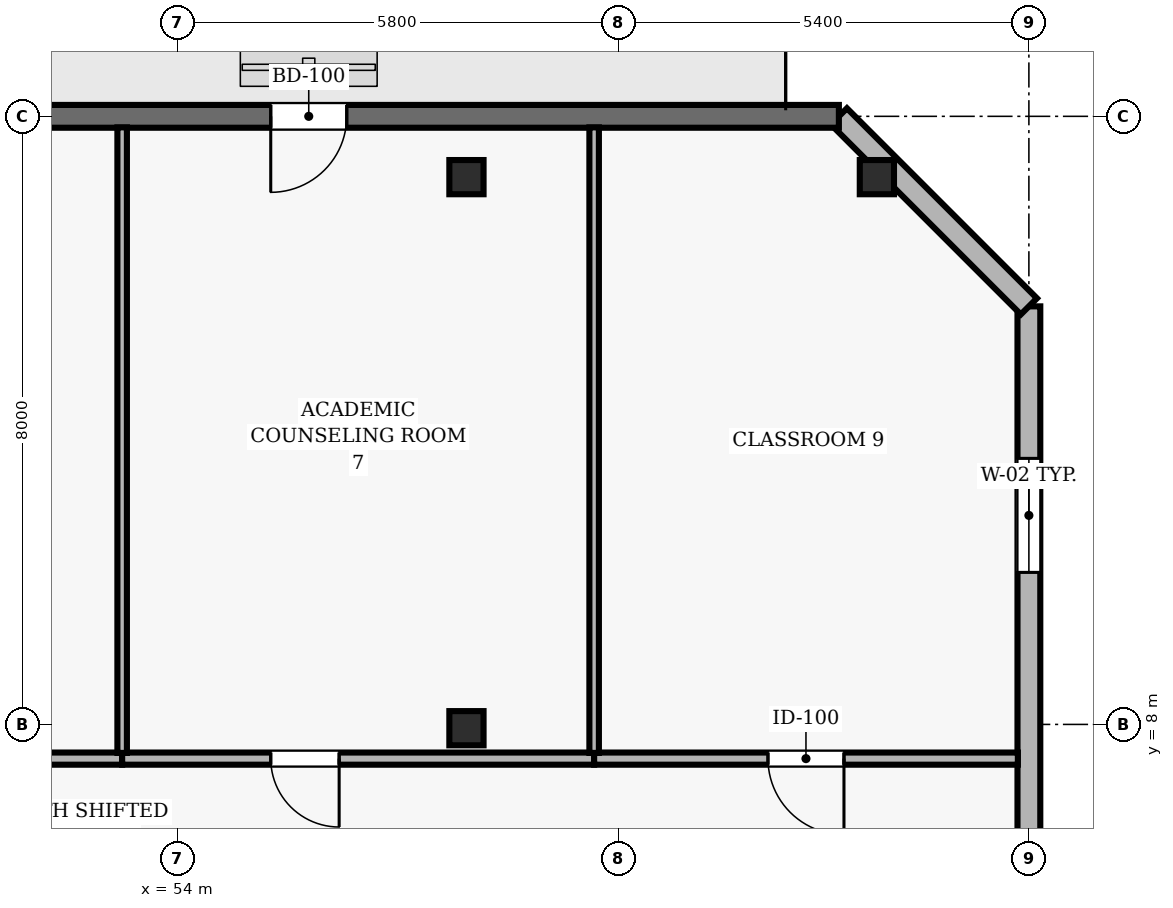
"""IFC4 building model, lengths in metres.
Left out: names, types, materials, properties, quantities, classifications, styles, units other than length and angle.
Written with IfcOpenShell. Run it as: python <this file> out.ifc"""

import sys

from ifc_helpers import new_model, si_unit, direction, frame, frame_2d, origin, origin_2d, place, context, subcontext, project, spatial, rectangle, hollow_rectangle, extrude, element, fill, save


model = new_model("IFC4")
c1 = context("Model", 3, precision=1e-05, world=origin(), true_north=direction((0.0, 1.0)))
c2 = subcontext(c1, "Body", "Model", "MODEL_VIEW")
j1 = project(units=[si_unit("LENGTHUNIT", "METRE"), si_unit("PLANEANGLEUNIT", "RADIAN")], contexts=[c1])
p1 = place(None, origin())
s1 = spatial("IfcSite", under=j1, at=p1, CompositionType="ELEMENT")
p2 = place(p1, origin())
s2 = spatial("IfcBuilding", under=s1, at=p2, CompositionType="ELEMENT")
p3 = place(p2, frame((0.0, 0.0, 195.3)))
s3 = spatial("IfcBuildingStorey", under=s2, at=p3, CompositionType="ELEMENT", Elevation=195.3)
for number, where, z_axis, x_axis in (
    (1, (57.8, 7.95, 0.0), (0.0, 0.0, 1.0), (1.0, 0.0, 0.0)),
    (2, (57.8, 15.2, 0.0), (0.0, 0.0, 1.0), (1.0, 0.0, 0.0)),
    (3, (63.2, 15.2, 0.0), (0.0, 0.0, 1.0), (1.0, 0.0, 0.0)),
):
    element("IfcColumn", number, at=place(p3, frame(where, z_axis=z_axis, x_axis=x_axis)), inside=s3, PredefinedType="COLUMN", context=c2, shape_type="SweptSolid", body=[
        extrude(hollow_rectangle(XDim=0.45, YDim=0.45, WallThickness=0.02, at=origin_2d()), origin(), (0.0, 0.0, 1.0), 3.9),
    ])
p4 = place(p3, frame((65.2, 2.5, 0.0), z_axis=(0.0, 0.0, 1.0), x_axis=(0.0, 1.0, 0.0)))
e4 = element("IfcWall", 4, at=p4, inside=s3, PredefinedType="SOLIDWALL", context=c2, shape_type="SweptSolid", body=[
    extrude(rectangle(XDim=11.0, YDim=0.3, at=frame_2d((5.5, 0.0))), origin(), (0.0, 0.0, 1.0), 3.69),
])
p5 = place(p4, frame((7.5, 0.0, 0.9)))
e5 = element("IfcOpeningElement", 5, at=p5, cuts=e4, PredefinedType="OPENING", context=c2, shape_type="SweptSolid", body=[
    extrude(rectangle(XDim=1.5, YDim=1.6, at=frame_2d((0.75, 0.8))), frame((0.0, 0.16, 0.0), z_axis=(0.0, -1.0, 0.0), x_axis=(1.0, 0.0, 0.0)), (0.0, 0.0, 1.0), 0.32),
])
p6 = place(p3, frame((65.2, 13.5, 0.0), z_axis=(0.0, 0.0, 1.0), x_axis=(-0.707106781187, 0.707106781187, 0.0)))
e6 = element("IfcWall", 6, at=p6, inside=s3, PredefinedType="SOLIDWALL", context=c2, shape_type="SweptSolid", body=[
    extrude(rectangle(XDim=3.536, YDim=0.3, at=frame_2d((1.768, 0.0))), origin(), (0.0, 0.0, 1.0), 3.69),
])
p7 = place(p3, frame((62.7, 16.0, 0.0), z_axis=(0.0, 0.0, 1.0), x_axis=(-1.0, 0.0, 0.0)))
e7 = element("IfcWall", 7, at=p7, inside=s3, PredefinedType="SOLIDWALL", context=c2, shape_type="SweptSolid", body=[
    extrude(rectangle(XDim=15.6, YDim=0.3, at=frame_2d((7.8, 0.0))), origin(), (0.0, 0.0, 1.0), 3.69),
])
p8 = place(p7, frame((6.475, 0.0, 0.0)))
e8 = element("IfcOpeningElement", 8, at=p8, cuts=e7, PredefinedType="OPENING", context=c2, shape_type="SweptSolid", body=[
    extrude(rectangle(XDim=1.0, YDim=2.2, at=frame_2d((0.5, 1.1))), frame((0.0, 0.16, 0.0), z_axis=(0.0, -1.0, 0.0), x_axis=(1.0, 0.0, 0.0)), (0.0, 0.0, 1.0), 0.32),
])
p9 = place(p7, frame((13.675, 0.0, 0.0)))
e9 = element("IfcOpeningElement", 9, at=p9, cuts=e7, PredefinedType="OPENING", context=c2, shape_type="SweptSolid", body=[
    extrude(rectangle(XDim=1.35, YDim=2.2, at=frame_2d((0.675, 1.1))), frame((0.0, 0.16, 0.0), z_axis=(0.0, -1.0, 0.0), x_axis=(1.0, 0.0, 0.0)), (0.0, 0.0, 1.0), 0.32),
])
p10 = place(p7, frame((10.65, 0.0, 0.9)))
e10 = element("IfcOpeningElement", 10, at=p10, cuts=e7, PredefinedType="OPENING", context=c2, shape_type="SweptSolid", body=[
    extrude(rectangle(XDim=2.1, YDim=1.6, at=frame_2d((1.05, 0.8))), frame((0.0, 0.16, 0.0), z_axis=(0.0, -1.0, 0.0), x_axis=(1.0, 0.0, 0.0)), (0.0, 0.0, 1.0), 0.32),
])
p11 = place(p3, frame((53.27, 7.55, 0.0), z_axis=(0.0, 0.0, 1.0), x_axis=(-1.0, 0.0, 0.0)))
e11 = element("IfcWall", 11, at=p11, inside=s3, PredefinedType="PARTITIONING", context=c2, shape_type="SweptSolid", body=[
    extrude(rectangle(XDim=7.27, YDim=0.16, at=frame_2d((3.635, 0.0))), origin(), (0.0, 0.0, 1.0), 3.146),
])
p12 = place(p11, frame((3.185, 0.0, 0.0)))
e12 = element("IfcOpeningElement", 12, at=p12, cuts=e11, PredefinedType="OPENING", context=c2, shape_type="SweptSolid", body=[
    extrude(rectangle(XDim=0.9, YDim=2.1, at=frame_2d((0.45, 1.05))), frame((0.0, 0.09, 0.0), z_axis=(0.0, -1.0, 0.0), x_axis=(1.0, 0.0, 0.0)), (0.0, 0.0, 1.0), 0.18),
])
p13 = place(p3, frame((59.48, 7.55, 0.0), z_axis=(0.0, 0.0, 1.0), x_axis=(-1.0, 0.0, 0.0)))
e13 = element("IfcWall", 13, at=p13, inside=s3, PredefinedType="PARTITIONING", context=c2, shape_type="SweptSolid", body=[
    extrude(rectangle(XDim=6.21, YDim=0.16, at=frame_2d((3.105, 0.0))), origin(), (0.0, 0.0, 1.0), 3.146),
])
p14 = place(p13, frame((3.355, 0.0, 0.0)))
e14 = element("IfcOpeningElement", 14, at=p14, cuts=e13, PredefinedType="OPENING", context=c2, shape_type="SweptSolid", body=[
    extrude(rectangle(XDim=0.9, YDim=2.1, at=frame_2d((0.45, 1.05))), frame((0.0, 0.09, 0.0), z_axis=(0.0, -1.0, 0.0), x_axis=(1.0, 0.0, 0.0)), (0.0, 0.0, 1.0), 0.18),
])
p15 = place(p3, frame((65.055, 7.55, 0.0), z_axis=(0.0, 0.0, 1.0), x_axis=(-1.0, 0.0, 0.0)))
e15 = element("IfcWall", 15, at=p15, inside=s3, PredefinedType="PARTITIONING", context=c2, shape_type="SweptSolid", body=[
    extrude(rectangle(XDim=5.575, YDim=0.16, at=frame_2d((2.788, 0.0))), origin(), (0.0, 0.0, 1.0), 3.69),
])
p16 = place(p15, frame((2.288, 0.0, 0.0)))
e16 = element("IfcOpeningElement", 16, at=p16, cuts=e15, PredefinedType="OPENING", context=c2, shape_type="SweptSolid", body=[
    extrude(rectangle(XDim=1.0, YDim=2.1, at=frame_2d((0.5, 1.05))), frame((0.0, 0.09, 0.0), z_axis=(0.0, -1.0, 0.0), x_axis=(1.0, 0.0, 0.0)), (0.0, 0.0, 1.0), 0.18),
])
for number, where, z_axis, x_axis in (
    (17, (53.27, 7.625, 0.0), (0.0, 0.0, 1.0), (0.0, 1.0, 0.0)),
    (18, (59.48, 7.625, 0.0), (0.0, 0.0, 1.0), (0.0, 1.0, 0.0)),
):
    element("IfcWall", number, at=place(p3, frame(where, z_axis=z_axis, x_axis=x_axis)), inside=s3, PredefinedType="PARTITIONING", context=c2, shape_type="SweptSolid", body=[
        extrude(rectangle(XDim=8.23, YDim=0.125, at=frame_2d((4.115, 0.0))), origin(), (0.0, 0.0, 1.0), 3.69),
    ])
p17 = place(p5, origin())
e19 = element("IfcWindow", 19, at=p17, inside=s3, PartitioningType="SINGLE_PANEL", PredefinedType="WINDOW", context=c2, shape_type="SweptSolid", body=[
    extrude(rectangle(XDim=1.5, YDim=1.6, at=frame_2d((0.75, 0.8))), frame((0.0, 0.03, 0.0), z_axis=(0.0, -1.0, 0.0), x_axis=(1.0, 0.0, 0.0)), (0.0, 0.0, 1.0), 0.06),
])
fill(e5, e19)
p18 = place(p8, origin())
e20 = element("IfcDoor", 20, at=p18, inside=s3, OperationType="SINGLE_SWING_RIGHT", PredefinedType="DOOR", context=c2, shape_type="SweptSolid", body=[
    extrude(rectangle(XDim=1.0, YDim=2.2, at=frame_2d((0.5, 1.1))), frame((0.0, 0.025, 0.0), z_axis=(0.0, -1.0, 0.0), x_axis=(1.0, 0.0, 0.0)), (0.0, 0.0, 1.0), 0.05),
])
fill(e8, e20)
p19 = place(p14, origin())
e21 = element("IfcDoor", 21, at=p19, inside=s3, OperationType="SINGLE_SWING_LEFT", PredefinedType="DOOR", context=c2, shape_type="SweptSolid", body=[
    extrude(rectangle(XDim=0.9, YDim=2.1, at=frame_2d((0.45, 1.05))), frame((0.0, 0.025, 0.0), z_axis=(0.0, -1.0, 0.0), x_axis=(1.0, 0.0, 0.0)), (0.0, 0.0, 1.0), 0.05),
])
fill(e14, e21)
p20 = place(p16, origin())
e22 = element("IfcDoor", 22, at=p20, inside=s3, OperationType="SINGLE_SWING_LEFT", PredefinedType="DOOR", context=c2, shape_type="SweptSolid", body=[
    extrude(rectangle(XDim=1.0, YDim=2.1, at=frame_2d((0.5, 1.05))), frame((0.0, 0.025, 0.0), z_axis=(0.0, -1.0, 0.0), x_axis=(1.0, 0.0, 0.0)), (0.0, 0.0, 1.0), 0.05),
])
fill(e16, e22)
save(model, sys.argv[1])
